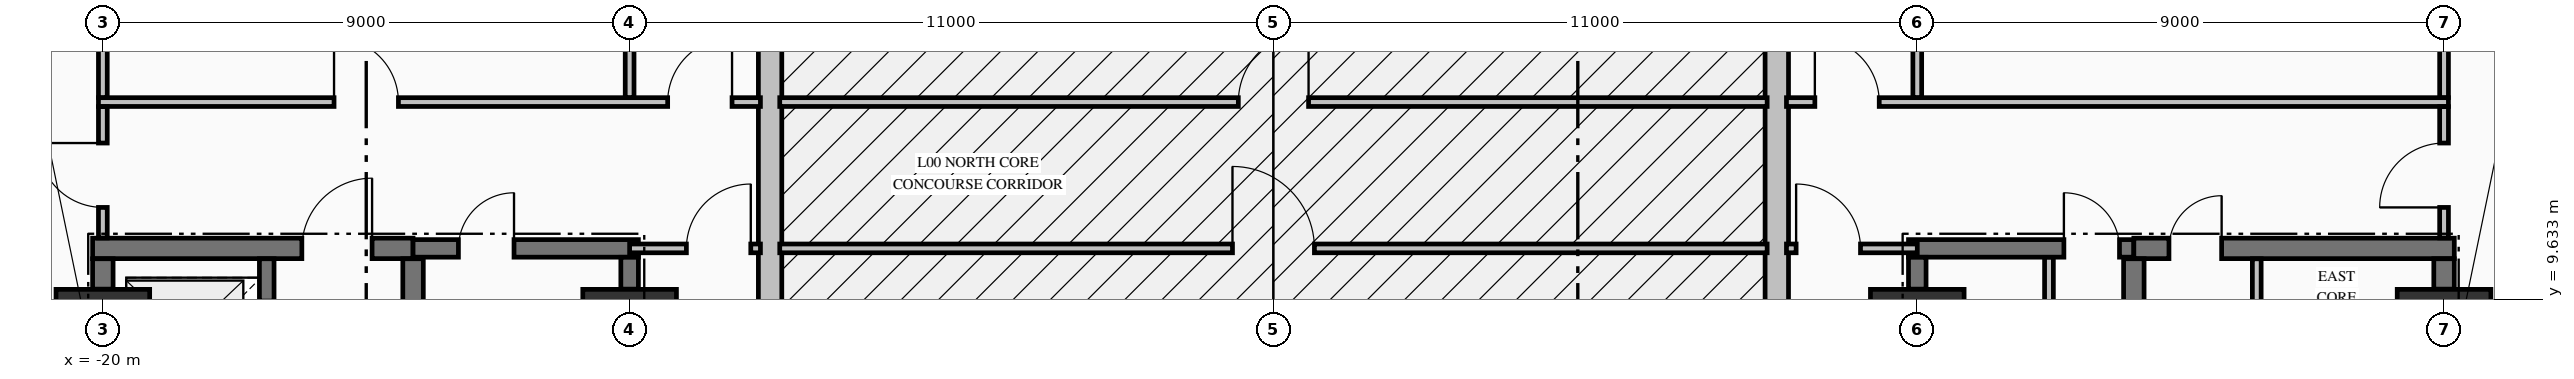
"""IFC4 building model, lengths in metres.
Left out: names, types, materials, properties, quantities, classifications, styles, units other than length and angle.
Written with IfcOpenShell. Run it as: python <this file> out.ifc"""

import sys

from ifc_helpers import new_model, si_unit, direction, frame, frame_2d, origin, origin_2d, place, context, subcontext, project, spatial, rectangle, extrude, element, fill, save


model = new_model("IFC4")
c1 = context("Model", 3, precision=1e-05, world=origin(), true_north=direction((0.0, 1.0)))
c2 = subcontext(c1, "Body", "Model", "MODEL_VIEW")
j1 = project(units=[si_unit("LENGTHUNIT", "METRE"), si_unit("PLANEANGLEUNIT", "RADIAN")], contexts=[c1])
p1 = place(None, origin())
s1 = spatial("IfcSite", under=j1, at=p1, CompositionType="ELEMENT")
p2 = place(p1, origin())
s2 = spatial("IfcBuilding", under=s1, at=p2, CompositionType="ELEMENT")
p3 = place(p2, origin())
s3 = spatial("IfcBuildingStorey", under=s2, at=p3, CompositionType="ELEMENT", Elevation=0.0)
for number, where, z_axis, x_axis in (
    (1, (-20.0, 9.0, 0.0), (0.0, 0.0, 1.0), (1.0, 0.0, 0.0)),
    (2, (-11.0, 9.0, 0.0), (0.0, 0.0, 1.0), (1.0, 0.0, 0.0)),
    (3, (11.0, 9.0, 0.0), (0.0, 0.0, 1.0), (1.0, 0.0, 0.0)),
    (4, (20.0, 9.0, 0.0), (0.0, 0.0, 1.0), (1.0, 0.0, 0.0)),
):
    element("IfcColumn", number, at=place(p3, frame(where, z_axis=z_axis, x_axis=x_axis)), inside=s3, PredefinedType="COLUMN", context=c2, shape_type="SweptSolid", body=[
        extrude(rectangle(XDim=1.6, YDim=1.6, at=origin_2d()), origin(), (0.0, 0.0, 1.0), 5.09),
    ])
for number, where, z_axis, x_axis in (
    (5, (-8.6, 0.65, 0.0), (0.0, 0.0, 1.0), (0.0, 1.0, 0.0)),
    (6, (8.6, 15.35, 0.0), (0.0, 0.0, 1.0), (0.0, -1.0, 0.0)),
):
    element("IfcWall", number, at=place(p3, frame(where, z_axis=z_axis, x_axis=x_axis)), inside=s3, PredefinedType="STANDARD", context=c2, shape_type="SweptSolid", body=[
        extrude(rectangle(XDim=14.7, YDim=0.4, at=frame_2d((7.35, 0.0))), origin(), (0.0, 0.0, 1.0), 4.132),
    ])
p4 = place(p3, frame((-20.175, 10.5, 0.0), z_axis=(0.0, 0.0, 1.0), x_axis=(1.0, 0.0, 0.0)))
e7 = element("IfcWall", 7, at=p4, inside=s3, PredefinedType="SHEAR", context=c2, shape_type="SweptSolid", body=[
    extrude(rectangle(XDim=5.475, YDim=0.35, at=frame_2d((2.738, 0.0))), origin(), (0.0, 0.0, 1.0), 5.09),
])
p5 = place(p4, frame((3.575, 0.0, 0.0)))
e8 = element("IfcOpeningElement", 8, at=p5, cuts=e7, PredefinedType="OPENING", context=c2, shape_type="SweptSolid", body=[
    extrude(rectangle(XDim=1.2, YDim=2.15, at=frame_2d((0.6, 1.075))), frame((0.0, 0.185, 0.0), z_axis=(0.0, -1.0, 0.0), x_axis=(1.0, 0.0, 0.0)), (0.0, 0.0, 1.0), 0.37),
])
p6 = place(p3, frame((-14.7, 10.5, 0.0), z_axis=(0.0, 0.0, 1.0), x_axis=(1.0, 0.0, 0.0)))
e9 = element("IfcWall", 9, at=p6, inside=s3, PredefinedType="SHEAR", context=c2, shape_type="SweptSolid", body=[
    extrude(rectangle(XDim=3.85, YDim=0.3, at=frame_2d((1.925, 0.0))), origin(), (0.0, 0.0, 1.0), 5.09),
])
p7 = place(p6, frame((0.775, 0.0, 0.0)))
e10 = element("IfcOpeningElement", 10, at=p7, cuts=e9, PredefinedType="OPENING", context=c2, shape_type="SweptSolid", body=[
    extrude(rectangle(XDim=0.95, YDim=2.15, at=frame_2d((0.475, 1.075))), frame((0.0, 0.16, 0.0), z_axis=(0.0, -1.0, 0.0), x_axis=(1.0, 0.0, 0.0)), (0.0, 0.0, 1.0), 0.32),
])
p8 = place(p3, frame((10.85, 10.5, 0.0), z_axis=(0.0, 0.0, 1.0), x_axis=(1.0, 0.0, 0.0)))
e11 = element("IfcWall", 11, at=p8, inside=s3, PredefinedType="SHEAR", context=c2, shape_type="SweptSolid", body=[
    extrude(rectangle(XDim=3.85, YDim=0.3, at=frame_2d((1.925, 0.0))), origin(), (0.0, 0.0, 1.0), 5.09),
])
p9 = place(p8, frame((2.655, 0.0, 0.0)))
e12 = element("IfcOpeningElement", 12, at=p9, cuts=e11, PredefinedType="OPENING", context=c2, shape_type="SweptSolid", body=[
    extrude(rectangle(XDim=0.95, YDim=2.15, at=frame_2d((0.475, 1.075))), frame((0.0, 0.16, 0.0), z_axis=(0.0, -1.0, 0.0), x_axis=(1.0, 0.0, 0.0)), (0.0, 0.0, 1.0), 0.32),
])
p10 = place(p3, frame((14.7, 10.5, 0.0), z_axis=(0.0, 0.0, 1.0), x_axis=(1.0, 0.0, 0.0)))
e13 = element("IfcWall", 13, at=p10, inside=s3, PredefinedType="SHEAR", context=c2, shape_type="SweptSolid", body=[
    extrude(rectangle(XDim=5.475, YDim=0.35, at=frame_2d((2.738, 0.0))), origin(), (0.0, 0.0, 1.0), 5.09),
])
p11 = place(p10, frame((0.6, 0.0, 0.0)))
e14 = element("IfcOpeningElement", 14, at=p11, cuts=e13, PredefinedType="OPENING", context=c2, shape_type="SweptSolid", body=[
    extrude(rectangle(XDim=0.9, YDim=2.15, at=frame_2d((0.45, 1.075))), frame((0.0, 0.185, 0.0), z_axis=(0.0, -1.0, 0.0), x_axis=(1.0, 0.0, 0.0)), (0.0, 0.0, 1.0), 0.37),
])
p12 = place(p3, frame((-11.0, 10.5, 0.0), z_axis=(0.0, 0.0, 1.0), x_axis=(1.0, 0.0, 0.0)))
e15 = element("IfcWall", 15, at=p12, inside=s3, PredefinedType="PARTITIONING", context=c2, shape_type="SweptSolid", body=[
    extrude(rectangle(XDim=2.235, YDim=0.15, at=frame_2d((1.118, 0.0))), origin(), (0.0, 0.0, 1.0), 5.09),
])
p13 = place(p12, frame((0.97, 0.0, 0.0)))
e16 = element("IfcOpeningElement", 16, at=p13, cuts=e15, PredefinedType="OPENING", context=c2, shape_type="SweptSolid", body=[
    extrude(rectangle(XDim=1.1, YDim=2.15, at=frame_2d((0.55, 1.075))), frame((0.0, 0.085, 0.0), z_axis=(0.0, -1.0, 0.0), x_axis=(1.0, 0.0, 0.0)), (0.0, 0.0, 1.0), 0.17),
])
p14 = place(p3, frame((-8.435, 10.5, 0.0), z_axis=(0.0, 0.0, 1.0), x_axis=(1.0, 0.0, 0.0)))
e17 = element("IfcWall", 17, at=p14, inside=s3, PredefinedType="PARTITIONING", context=c2, shape_type="SweptSolid", body=[
    extrude(rectangle(XDim=16.87, YDim=0.15, at=frame_2d((8.435, 0.0))), origin(), (0.0, 0.0, 1.0), 5.09),
])
p15 = place(p14, frame((7.735, 0.0, 0.0)))
e18 = element("IfcOpeningElement", 18, at=p15, cuts=e17, PredefinedType="OPENING", context=c2, shape_type="SweptSolid", body=[
    extrude(rectangle(XDim=1.4, YDim=2.2, at=frame_2d((0.7, 1.1))), frame((0.0, 0.085, 0.0), z_axis=(0.0, -1.0, 0.0), x_axis=(1.0, 0.0, 0.0)), (0.0, 0.0, 1.0), 0.17),
])
p16 = place(p3, frame((8.765, 10.5, 0.0), z_axis=(0.0, 0.0, 1.0), x_axis=(1.0, 0.0, 0.0)))
e19 = element("IfcWall", 19, at=p16, inside=s3, PredefinedType="PARTITIONING", context=c2, shape_type="SweptSolid", body=[
    extrude(rectangle(XDim=2.235, YDim=0.15, at=frame_2d((1.118, 0.0))), origin(), (0.0, 0.0, 1.0), 5.09),
])
p17 = place(p16, frame((0.165, 0.0, 0.0)))
e20 = element("IfcOpeningElement", 20, at=p17, cuts=e19, PredefinedType="OPENING", context=c2, shape_type="SweptSolid", body=[
    extrude(rectangle(XDim=1.1, YDim=2.15, at=frame_2d((0.55, 1.075))), frame((0.0, 0.085, 0.0), z_axis=(0.0, -1.0, 0.0), x_axis=(1.0, 0.0, 0.0)), (0.0, 0.0, 1.0), 0.17),
])
p18 = place(p3, frame((-20.075, 13.0, 0.0), z_axis=(0.0, 0.0, 1.0), x_axis=(1.0, 0.0, 0.0)))
e21 = element("IfcWall", 21, at=p18, inside=s3, PredefinedType="PARTITIONING", context=c2, shape_type="SweptSolid", body=[
    extrude(rectangle(XDim=11.31, YDim=0.15, at=frame_2d((5.655, 0.0))), origin(), (0.0, 0.0, 1.0), 5.09),
])
p19 = place(p18, frame((4.025, 0.0, 0.0)))
e22 = element("IfcOpeningElement", 22, at=p19, cuts=e21, PredefinedType="OPENING", context=c2, shape_type="SweptSolid", body=[
    extrude(rectangle(XDim=1.1, YDim=2.15, at=frame_2d((0.55, 1.075))), frame((0.0, 0.085, 0.0), z_axis=(0.0, -1.0, 0.0), x_axis=(1.0, 0.0, 0.0)), (0.0, 0.0, 1.0), 0.17),
])
p20 = place(p18, frame((9.725, 0.0, 0.0)))
e23 = element("IfcOpeningElement", 23, at=p20, cuts=e21, PredefinedType="OPENING", context=c2, shape_type="SweptSolid", body=[
    extrude(rectangle(XDim=1.1, YDim=2.15, at=frame_2d((0.55, 1.075))), frame((0.0, 0.085, 0.0), z_axis=(0.0, -1.0, 0.0), x_axis=(1.0, 0.0, 0.0)), (0.0, 0.0, 1.0), 0.17),
])
p21 = place(p3, frame((-8.435, 13.0, 0.0), z_axis=(0.0, 0.0, 1.0), x_axis=(1.0, 0.0, 0.0)))
e24 = element("IfcWall", 24, at=p21, inside=s3, PredefinedType="PARTITIONING", context=c2, shape_type="SweptSolid", body=[
    extrude(rectangle(XDim=16.87, YDim=0.15, at=frame_2d((8.435, 0.0))), origin(), (0.0, 0.0, 1.0), 5.09),
])
p22 = place(p21, frame((7.835, 0.0, 0.0)))
e25 = element("IfcOpeningElement", 25, at=p22, cuts=e24, PredefinedType="OPENING", context=c2, shape_type="SweptSolid", body=[
    extrude(rectangle(XDim=1.2, YDim=2.15, at=frame_2d((0.6, 1.075))), frame((0.0, 0.085, 0.0), z_axis=(0.0, -1.0, 0.0), x_axis=(1.0, 0.0, 0.0)), (0.0, 0.0, 1.0), 0.17),
])
p23 = place(p3, frame((8.765, 13.0, 0.0), z_axis=(0.0, 0.0, 1.0), x_axis=(1.0, 0.0, 0.0)))
e26 = element("IfcWall", 26, at=p23, inside=s3, PredefinedType="PARTITIONING", context=c2, shape_type="SweptSolid", body=[
    extrude(rectangle(XDim=11.31, YDim=0.15, at=frame_2d((5.655, 0.0))), origin(), (0.0, 0.0, 1.0), 5.09),
])
p24 = place(p23, frame((0.485, 0.0, 0.0)))
e27 = element("IfcOpeningElement", 27, at=p24, cuts=e26, PredefinedType="OPENING", context=c2, shape_type="SweptSolid", body=[
    extrude(rectangle(XDim=1.1, YDim=2.15, at=frame_2d((0.55, 1.075))), frame((0.0, 0.085, 0.0), z_axis=(0.0, -1.0, 0.0), x_axis=(1.0, 0.0, 0.0)), (0.0, 0.0, 1.0), 0.17),
])
p25 = place(p3, frame((-20.0, 9.804, 0.0), z_axis=(0.0, 0.0, 1.0), x_axis=(0.0, 1.0, 0.0)))
e28 = element("IfcWall", 28, at=p25, inside=s3, PredefinedType="SHEAR", context=c2, shape_type="SweptSolid", body=[
    extrude(rectangle(XDim=0.519, YDim=0.35, at=frame_2d((0.26, 0.0))), origin(), (0.0, 0.0, 1.0), 5.09),
])
p26 = place(p3, frame((-17.2, 7.727, 0.0), z_axis=(0.0, 0.0, 1.0), x_axis=(0.0, 1.0, 0.0)))
e29 = element("IfcWall", 29, at=p26, inside=s3, PredefinedType="SOLIDWALL", context=c2, shape_type="SweptSolid", body=[
    extrude(rectangle(XDim=2.596, YDim=0.25, at=frame_2d((1.298, 0.0))), origin(), (0.0, 0.0, 1.0), 5.09),
])
p27 = place(p26, frame((0.773, 0.0, 0.0)))
e30 = element("IfcOpeningElement", 30, at=p27, cuts=e29, PredefinedType="OPENING", context=c2, shape_type="SweptSolid", body=[
    extrude(rectangle(XDim=1.1, YDim=2.2, at=frame_2d((0.55, 1.1))), frame((0.0, 0.135, 0.0), z_axis=(0.0, -1.0, 0.0), x_axis=(1.0, 0.0, 0.0)), (0.0, 0.0, 1.0), 0.27),
])
p28 = place(p3, frame((-14.7, 5.852, 0.0), z_axis=(0.0, 0.0, 1.0), x_axis=(0.0, 1.0, 0.0)))
e31 = element("IfcWall", 31, at=p28, inside=s3, PredefinedType="SHEAR", context=c2, shape_type="SweptSolid", body=[
    extrude(rectangle(XDim=4.471, YDim=0.35, at=frame_2d((2.235, 0.0))), origin(), (0.0, 0.0, 1.0), 5.09),
])
for number, where, z_axis, x_axis in (
    (32, (-11.0, 9.804, 0.0), (0.0, 0.0, 1.0), (0.0, 1.0, 0.0)),
    (33, (11.0, 9.804, 0.0), (0.0, 0.0, 1.0), (0.0, 1.0, 0.0)),
):
    element("IfcWall", number, at=place(p3, frame(where, z_axis=z_axis, x_axis=x_axis)), inside=s3, PredefinedType="SHEAR", context=c2, shape_type="SweptSolid", body=[
        extrude(rectangle(XDim=0.544, YDim=0.3, at=frame_2d((0.272, 0.0))), origin(), (0.0, 0.0, 1.0), 5.09),
    ])
p29 = place(p3, frame((14.7, 5.852, 0.0), z_axis=(0.0, 0.0, 1.0), x_axis=(0.0, 1.0, 0.0)))
e34 = element("IfcWall", 34, at=p29, inside=s3, PredefinedType="SHEAR", context=c2, shape_type="SweptSolid", body=[
    extrude(rectangle(XDim=4.471, YDim=0.35, at=frame_2d((2.235, 0.0))), origin(), (0.0, 0.0, 1.0), 5.09),
])
p30 = place(p3, frame((20.0, 9.804, 0.0), z_axis=(0.0, 0.0, 1.0), x_axis=(0.0, 1.0, 0.0)))
e35 = element("IfcWall", 35, at=p30, inside=s3, PredefinedType="SHEAR", context=c2, shape_type="SweptSolid", body=[
    extrude(rectangle(XDim=0.519, YDim=0.35, at=frame_2d((0.26, 0.0))), origin(), (0.0, 0.0, 1.0), 5.09),
])
p31 = place(p3, frame((-20.0, 10.678, 0.0), z_axis=(0.0, 0.0, 1.0), x_axis=(0.0, 1.0, 0.0)))
e36 = element("IfcWall", 36, at=p31, inside=s3, PredefinedType="PARTITIONING", context=c2, shape_type="SweptSolid", body=[
    extrude(rectangle(XDim=2.244, YDim=0.15, at=frame_2d((1.122, 0.0))), origin(), (0.0, 0.0, 1.0), 4.132),
])
p32 = place(p31, frame((0.522, 0.0, 0.0)))
e37 = element("IfcOpeningElement", 37, at=p32, cuts=e36, PredefinedType="OPENING", context=c2, shape_type="SweptSolid", body=[
    extrude(rectangle(XDim=1.1, YDim=2.15, at=frame_2d((0.55, 1.075))), frame((0.0, 0.085, 0.0), z_axis=(0.0, -1.0, 0.0), x_axis=(1.0, 0.0, 0.0)), (0.0, 0.0, 1.0), 0.17),
])
p33 = place(p3, frame((-20.0, 13.078, 0.0), z_axis=(0.0, 0.0, 1.0), x_axis=(0.0, 1.0, 0.0)))
e38 = element("IfcWall", 38, at=p33, inside=s3, PredefinedType="PARTITIONING", context=c2, shape_type="SweptSolid", body=[
    extrude(rectangle(XDim=2.116, YDim=0.15, at=frame_2d((1.058, 0.0))), origin(), (0.0, 0.0, 1.0), 4.132),
])
p34 = place(p33, frame((0.897, 0.0, 0.0)))
e39 = element("IfcOpeningElement", 39, at=p34, cuts=e38, PredefinedType="OPENING", context=c2, shape_type="SweptSolid", body=[
    extrude(rectangle(XDim=1.05, YDim=2.15, at=frame_2d((0.525, 1.075))), frame((0.0, 0.085, 0.0), z_axis=(0.0, -1.0, 0.0), x_axis=(1.0, 0.0, 0.0)), (0.0, 0.0, 1.0), 0.17),
])
for number, where, z_axis, x_axis in (
    (40, (-11.0, 13.078, 0.0), (0.0, 0.0, 1.0), (0.0, 1.0, 0.0)),
    (41, (11.0, 13.078, 0.0), (0.0, 0.0, 1.0), (0.0, 1.0, 0.0)),
):
    element("IfcWall", number, at=place(p3, frame(where, z_axis=z_axis, x_axis=x_axis)), inside=s3, PredefinedType="PARTITIONING", context=c2, shape_type="SweptSolid", body=[
        extrude(rectangle(XDim=2.116, YDim=0.15, at=frame_2d((1.058, 0.0))), origin(), (0.0, 0.0, 1.0), 4.132),
    ])
p35 = place(p3, frame((13.25, 5.853, 0.0), z_axis=(0.0, 0.0, 1.0), x_axis=(0.0, 1.0, 0.0)))
e42 = element("IfcWall", 42, at=p35, inside=s3, PredefinedType="PARTITIONING", context=c2, shape_type="SweptSolid", body=[
    extrude(rectangle(XDim=4.494, YDim=0.15, at=frame_2d((2.247, 0.0))), origin(), (0.0, 0.0, 1.0), 5.09),
])
p36 = place(p35, frame((1.472, 0.0, 0.0)))
e43 = element("IfcOpeningElement", 43, at=p36, cuts=e42, PredefinedType="OPENING", context=c2, shape_type="SweptSolid", body=[
    extrude(rectangle(XDim=0.95, YDim=2.15, at=frame_2d((0.475, 1.075))), frame((0.0, 0.085, 0.0), z_axis=(0.0, -1.0, 0.0), x_axis=(1.0, 0.0, 0.0)), (0.0, 0.0, 1.0), 0.17),
])
p37 = place(p3, frame((16.8, 6.578, 0.0), z_axis=(0.0, 0.0, 1.0), x_axis=(0.0, 1.0, 0.0)))
e44 = element("IfcWall", 44, at=p37, inside=s3, PredefinedType="PARTITIONING", context=c2, shape_type="SweptSolid", body=[
    extrude(rectangle(XDim=3.744, YDim=0.15, at=frame_2d((1.872, 0.0))), origin(), (0.0, 0.0, 1.0), 5.09),
])
p38 = place(p37, frame((1.447, 0.0, 0.0)))
e45 = element("IfcOpeningElement", 45, at=p38, cuts=e44, PredefinedType="OPENING", context=c2, shape_type="SweptSolid", body=[
    extrude(rectangle(XDim=0.95, YDim=2.15, at=frame_2d((0.475, 1.075))), frame((0.0, 0.085, 0.0), z_axis=(0.0, -1.0, 0.0), x_axis=(1.0, 0.0, 0.0)), (0.0, 0.0, 1.0), 0.17),
])
p39 = place(p3, frame((20.0, 10.678, 0.0), z_axis=(0.0, 0.0, 1.0), x_axis=(0.0, 1.0, 0.0)))
e46 = element("IfcWall", 46, at=p39, inside=s3, PredefinedType="PARTITIONING", context=c2, shape_type="SweptSolid", body=[
    extrude(rectangle(XDim=2.244, YDim=0.15, at=frame_2d((1.122, 0.0))), origin(), (0.0, 0.0, 1.0), 4.132),
])
p40 = place(p39, frame((0.522, 0.0, 0.0)))
e47 = element("IfcOpeningElement", 47, at=p40, cuts=e46, PredefinedType="OPENING", context=c2, shape_type="SweptSolid", body=[
    extrude(rectangle(XDim=1.1, YDim=2.15, at=frame_2d((0.55, 1.075))), frame((0.0, 0.085, 0.0), z_axis=(0.0, -1.0, 0.0), x_axis=(1.0, 0.0, 0.0)), (0.0, 0.0, 1.0), 0.17),
])
p41 = place(p3, frame((20.0, 13.078, 0.0), z_axis=(0.0, 0.0, 1.0), x_axis=(0.0, 1.0, 0.0)))
e48 = element("IfcWall", 48, at=p41, inside=s3, PredefinedType="PARTITIONING", context=c2, shape_type="SweptSolid", body=[
    extrude(rectangle(XDim=2.116, YDim=0.15, at=frame_2d((1.058, 0.0))), origin(), (0.0, 0.0, 1.0), 4.132),
])
p42 = place(p7, origin())
e49 = element("IfcDoor", 49, at=p42, inside=s3, OperationType="SINGLE_SWING_RIGHT", PredefinedType="DOOR", context=c2, shape_type="SweptSolid", body=[
    extrude(rectangle(XDim=0.95, YDim=2.15, at=frame_2d((0.475, 1.075))), frame((0.0, 0.025, 0.0), z_axis=(0.0, -1.0, 0.0), x_axis=(1.0, 0.0, 0.0)), (0.0, 0.0, 1.0), 0.05),
])
fill(e10, e49)
p43 = place(p9, origin())
e50 = element("IfcDoor", 50, at=p43, inside=s3, OperationType="SINGLE_SWING_LEFT", PredefinedType="DOOR", context=c2, shape_type="SweptSolid", body=[
    extrude(rectangle(XDim=0.95, YDim=2.15, at=frame_2d((0.475, 1.075))), frame((0.0, 0.025, 0.0), z_axis=(0.0, -1.0, 0.0), x_axis=(1.0, 0.0, 0.0)), (0.0, 0.0, 1.0), 0.05),
])
fill(e12, e50)
p44 = place(p5, origin())
e51 = element("IfcDoor", 51, at=p44, inside=s3, OperationType="SINGLE_SWING_RIGHT", PredefinedType="DOOR", context=c2, shape_type="SweptSolid", body=[
    extrude(rectangle(XDim=1.2, YDim=2.15, at=frame_2d((0.6, 1.075))), frame((0.0, 0.025, 0.0), z_axis=(0.0, -1.0, 0.0), x_axis=(1.0, 0.0, 0.0)), (0.0, 0.0, 1.0), 0.05),
])
fill(e8, e51)
p45 = place(p11, origin())
e52 = element("IfcDoor", 52, at=p45, inside=s3, OperationType="SINGLE_SWING_RIGHT", PredefinedType="DOOR", context=c2, shape_type="SweptSolid", body=[
    extrude(rectangle(XDim=0.9, YDim=2.15, at=frame_2d((0.45, 1.075))), frame((0.0, 0.025, 0.0), z_axis=(0.0, -1.0, 0.0), x_axis=(1.0, 0.0, 0.0)), (0.0, 0.0, 1.0), 0.05),
])
fill(e14, e52)
p46 = place(p19, origin())
e53 = element("IfcDoor", 53, at=p46, inside=s3, OperationType="SINGLE_SWING_LEFT", PredefinedType="DOOR", context=c2, shape_type="SweptSolid", body=[
    extrude(rectangle(XDim=1.1, YDim=2.15, at=frame_2d((0.55, 1.075))), frame((0.0, 0.025, 0.0), z_axis=(0.0, -1.0, 0.0), x_axis=(1.0, 0.0, 0.0)), (0.0, 0.0, 1.0), 0.05),
])
fill(e22, e53)
p47 = place(p20, origin())
e54 = element("IfcDoor", 54, at=p47, inside=s3, OperationType="SINGLE_SWING_RIGHT", PredefinedType="DOOR", context=c2, shape_type="SweptSolid", body=[
    extrude(rectangle(XDim=1.1, YDim=2.15, at=frame_2d((0.55, 1.075))), frame((0.0, 0.025, 0.0), z_axis=(0.0, -1.0, 0.0), x_axis=(1.0, 0.0, 0.0)), (0.0, 0.0, 1.0), 0.05),
])
fill(e23, e54)
p48 = place(p24, origin())
e55 = element("IfcDoor", 55, at=p48, inside=s3, OperationType="SINGLE_SWING_LEFT", PredefinedType="DOOR", context=c2, shape_type="SweptSolid", body=[
    extrude(rectangle(XDim=1.1, YDim=2.15, at=frame_2d((0.55, 1.075))), frame((0.0, 0.025, 0.0), z_axis=(0.0, -1.0, 0.0), x_axis=(1.0, 0.0, 0.0)), (0.0, 0.0, 1.0), 0.05),
])
fill(e27, e55)
p49 = place(p13, origin())
e56 = element("IfcDoor", 56, at=p49, inside=s3, OperationType="SINGLE_SWING_RIGHT", PredefinedType="DOOR", context=c2, shape_type="SweptSolid", body=[
    extrude(rectangle(XDim=1.1, YDim=2.15, at=frame_2d((0.55, 1.075))), frame((0.0, 0.025, 0.0), z_axis=(0.0, -1.0, 0.0), x_axis=(1.0, 0.0, 0.0)), (0.0, 0.0, 1.0), 0.05),
])
fill(e16, e56)
p50 = place(p17, origin())
e57 = element("IfcDoor", 57, at=p50, inside=s3, OperationType="SINGLE_SWING_LEFT", PredefinedType="DOOR", context=c2, shape_type="SweptSolid", body=[
    extrude(rectangle(XDim=1.1, YDim=2.15, at=frame_2d((0.55, 1.075))), frame((0.0, 0.025, 0.0), z_axis=(0.0, -1.0, 0.0), x_axis=(1.0, 0.0, 0.0)), (0.0, 0.0, 1.0), 0.05),
])
fill(e20, e57)
p51 = place(p32, origin())
e58 = element("IfcDoor", 58, at=p51, inside=s3, OperationType="SINGLE_SWING_RIGHT", PredefinedType="DOOR", context=c2, shape_type="SweptSolid", body=[
    extrude(rectangle(XDim=1.1, YDim=2.15, at=frame_2d((0.55, 1.075))), frame((0.0, 0.025, 0.0), z_axis=(0.0, -1.0, 0.0), x_axis=(1.0, 0.0, 0.0)), (0.0, 0.0, 1.0), 0.05),
])
fill(e37, e58)
p52 = place(p40, origin())
e59 = element("IfcDoor", 59, at=p52, inside=s3, OperationType="SINGLE_SWING_LEFT", PredefinedType="DOOR", context=c2, shape_type="SweptSolid", body=[
    extrude(rectangle(XDim=1.1, YDim=2.15, at=frame_2d((0.55, 1.075))), frame((0.0, 0.025, 0.0), z_axis=(0.0, -1.0, 0.0), x_axis=(1.0, 0.0, 0.0)), (0.0, 0.0, 1.0), 0.05),
])
fill(e47, e59)
p53 = place(p15, origin())
e60 = element("IfcDoor", 60, at=p53, inside=s3, OperationType="SINGLE_SWING_LEFT", PredefinedType="DOOR", context=c2, shape_type="SweptSolid", body=[
    extrude(rectangle(XDim=1.4, YDim=2.2, at=frame_2d((0.7, 1.1))), frame((0.0, 0.025, 0.0), z_axis=(0.0, -1.0, 0.0), x_axis=(1.0, 0.0, 0.0)), (0.0, 0.0, 1.0), 0.05),
])
fill(e18, e60)
p54 = place(p22, origin())
e61 = element("IfcDoor", 61, at=p54, inside=s3, OperationType="SINGLE_SWING_RIGHT", PredefinedType="DOOR", context=c2, shape_type="SweptSolid", body=[
    extrude(rectangle(XDim=1.2, YDim=2.15, at=frame_2d((0.6, 1.075))), frame((0.0, 0.025, 0.0), z_axis=(0.0, -1.0, 0.0), x_axis=(1.0, 0.0, 0.0)), (0.0, 0.0, 1.0), 0.05),
])
fill(e25, e61)
save(model, sys.argv[1])
